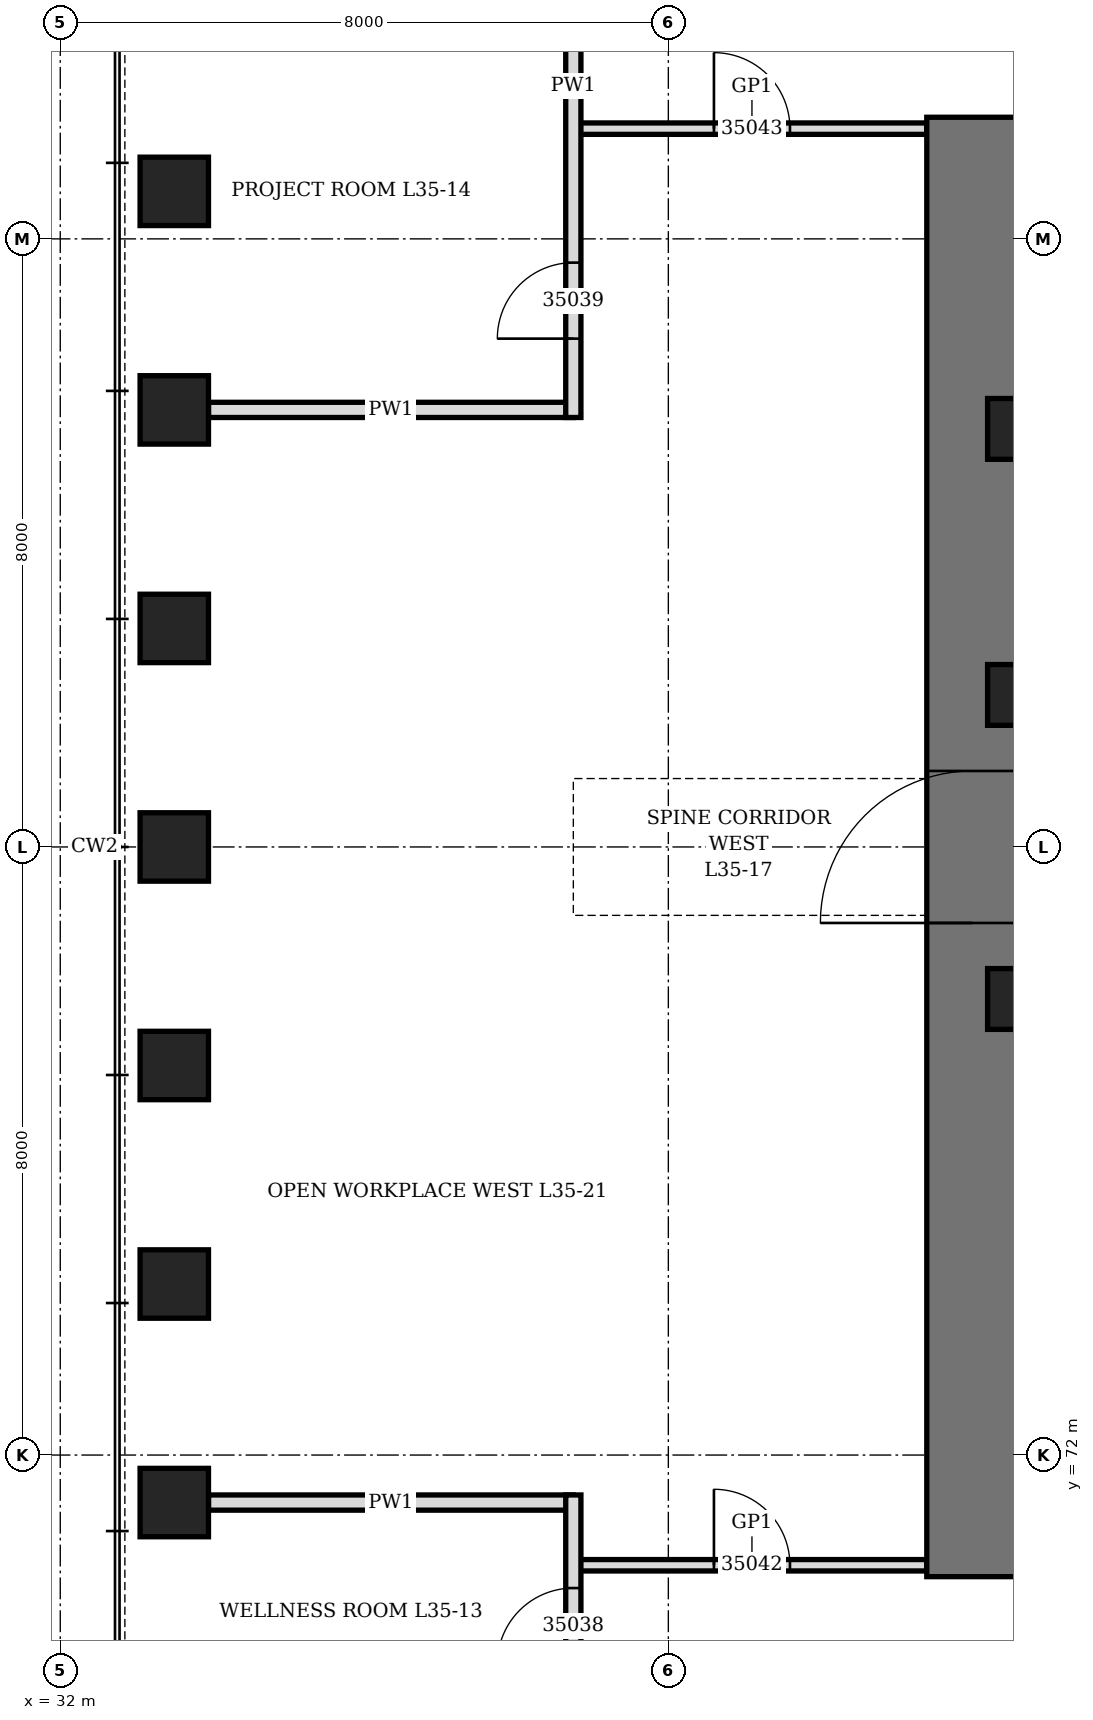
"""IFC4 building model, lengths in metres.
Left out: names, types, materials, properties, quantities, classifications, styles, units other than length and angle.
Written with IfcOpenShell. Run it as: python <this file> out.ifc"""

import sys

from ifc_helpers import new_model, si_unit, direction, frame, frame_2d, origin, origin_2d, place, context, subcontext, project, spatial, rectangle, hollow_rectangle, extrude, element, fill, save


model = new_model("IFC4")
c1 = context("Model", 3, precision=1e-05, world=origin(), true_north=direction((0.0, 1.0)))
c2 = subcontext(c1, "Body", "Model", "MODEL_VIEW")
j1 = project(units=[si_unit("LENGTHUNIT", "METRE"), si_unit("PLANEANGLEUNIT", "RADIAN")], contexts=[c1])
p1 = place(None, origin())
s1 = spatial("IfcSite", under=j1, at=p1, CompositionType="ELEMENT")
p2 = place(p1, origin())
s2 = spatial("IfcBuilding", under=s1, at=p2, CompositionType="ELEMENT")
p3 = place(p2, frame((0.0, 0.0, 158.5)))
s3 = spatial("IfcBuildingStorey", under=s2, at=p3, CompositionType="ELEMENT", Elevation=158.5)
for number, where, z_axis, x_axis in (
    (1, (33.5, 88.625, 0.0), (0.0, 0.0, 1.0), (0.0, 1.0, 0.0)),
    (2, (33.5, 85.75, 0.0), (0.0, 0.0, 1.0), (0.0, 1.0, 0.0)),
    (3, (33.5, 82.875, 0.0), (0.0, 0.0, 1.0), (0.0, 1.0, 0.0)),
    (4, (33.5, 80.0, 0.0), (0.0, 0.0, 1.0), (0.0, 1.0, 0.0)),
    (5, (33.5, 77.125, 0.0), (0.0, 0.0, 1.0), (0.0, 1.0, 0.0)),
    (6, (33.5, 74.25, 0.0), (0.0, 0.0, 1.0), (0.0, 1.0, 0.0)),
    (7, (33.5, 71.375, 0.0), (0.0, 0.0, 1.0), (0.0, 1.0, 0.0)),
):
    element("IfcColumn", number, at=place(p3, frame(where, z_axis=z_axis, x_axis=x_axis)), inside=s3, PredefinedType="COLUMN", context=c2, shape_type="SweptSolid", body=[
        extrude(hollow_rectangle(XDim=0.9, YDim=0.9, WallThickness=0.12, at=origin_2d()), origin(), (0.0, 0.0, 1.0), 4.2),
    ])
p4 = place(p3, frame((44.0, 70.4, 0.0), z_axis=(0.0, 0.0, 1.0), x_axis=(0.0, 1.0, 0.0)))
e8 = element("IfcWall", 8, at=p4, inside=s3, PredefinedType="SHEAR", context=c2, shape_type="SweptSolid", body=[
    extrude(rectangle(XDim=19.2, YDim=1.2, at=frame_2d((9.6, 0.0))), origin(), (0.0, 0.0, 1.0), 4.2),
])
p5 = place(p4, frame((8.6, 0.0, 0.0)))
e9 = element("IfcOpeningElement", 9, at=p5, cuts=e8, PredefinedType="OPENING", context=c2, shape_type="SweptSolid", body=[
    extrude(rectangle(XDim=2.0, YDim=2.4, at=frame_2d((1.0, 1.2))), frame((0.0, 0.61, 0.0), z_axis=(0.0, -1.0, 0.0), x_axis=(1.0, 0.0, 0.0)), (0.0, 0.0, 1.0), 1.22),
])
for number, where, z_axis, x_axis in (
    (10, (44.6, 78.0, 0.0), (0.0, 0.0, 1.0), (1.0, 0.0, 0.0)),
    (11, (44.6, 82.0, 0.0), (0.0, 0.0, 1.0), (1.0, 0.0, 0.0)),
    (12, (44.6, 85.5, 0.0), (0.0, 0.0, 1.0), (1.0, 0.0, 0.0)),
):
    element("IfcColumn", number, at=place(p3, frame(where, z_axis=z_axis, x_axis=x_axis)), inside=s3, PredefinedType="COLUMN", context=c2, shape_type="SweptSolid", body=[
        extrude(hollow_rectangle(XDim=0.8, YDim=0.8, WallThickness=0.1, at=origin_2d()), origin(), (0.0, 0.0, 1.0), 4.2),
    ])
for number, where, z_axis, x_axis in (
    (13, (33.95, 71.375, 0.0), (0.0, 0.0, 1.0), (1.0, 0.0, 0.0)),
    (14, (33.95, 85.75, 0.0), (0.0, 0.0, 1.0), (1.0, 0.0, 0.0)),
):
    element("IfcWall", number, at=place(p3, frame(where, z_axis=z_axis, x_axis=x_axis)), inside=s3, PredefinedType="PARTITIONING", context=c2, shape_type="SweptSolid", body=[
        extrude(rectangle(XDim=4.8, YDim=0.2, at=frame_2d((2.4, 0.0))), origin(), (0.0, 0.0, 1.0), 3.428),
    ])
p6 = place(p3, frame((38.8, 70.55, 0.0), z_axis=(0.0, 0.0, 1.0), x_axis=(1.0, 0.0, 0.0)))
e15 = element("IfcWall", 15, at=p6, inside=s3, PredefinedType="PARTITIONING", context=c2, shape_type="SweptSolid", body=[
    extrude(rectangle(XDim=4.6, YDim=0.15, at=frame_2d((2.3, 0.0))), origin(), (0.0, 0.0, 1.0), 4.04),
])
p7 = place(p6, frame((1.8, 0.0, 0.0)))
e16 = element("IfcOpeningElement", 16, at=p7, cuts=e15, PredefinedType="OPENING", context=c2, shape_type="SweptSolid", body=[
    extrude(rectangle(XDim=1.0, YDim=2.4, at=frame_2d((0.5, 1.2))), frame((0.0, 0.085, 0.0), z_axis=(0.0, -1.0, 0.0), x_axis=(1.0, 0.0, 0.0)), (0.0, 0.0, 1.0), 0.17),
])
p8 = place(p3, frame((38.8, 89.45, 0.0), z_axis=(0.0, 0.0, 1.0), x_axis=(1.0, 0.0, 0.0)))
e17 = element("IfcWall", 17, at=p8, inside=s3, PredefinedType="PARTITIONING", context=c2, shape_type="SweptSolid", body=[
    extrude(rectangle(XDim=4.6, YDim=0.15, at=frame_2d((2.3, 0.0))), origin(), (0.0, 0.0, 1.0), 4.04),
])
p9 = place(p8, frame((1.8, 0.0, 0.0)))
e18 = element("IfcOpeningElement", 18, at=p9, cuts=e17, PredefinedType="OPENING", context=c2, shape_type="SweptSolid", body=[
    extrude(rectangle(XDim=1.0, YDim=2.4, at=frame_2d((0.5, 1.2))), frame((0.0, 0.085, 0.0), z_axis=(0.0, -1.0, 0.0), x_axis=(1.0, 0.0, 0.0)), (0.0, 0.0, 1.0), 0.17),
])
p10 = place(p3, frame((38.75, 63.2, 0.0), z_axis=(0.0, 0.0, 1.0), x_axis=(0.0, 1.0, 0.0)))
e19 = element("IfcWall", 19, at=p10, inside=s3, PredefinedType="PARTITIONING", context=c2, shape_type="SweptSolid", body=[
    extrude(rectangle(XDim=8.275, YDim=0.2, at=frame_2d((4.138, 0.0))), origin(), (0.0, 0.0, 1.0), 4.04),
])
p11 = place(p10, frame((0.488, 0.0, 0.0)))
e20 = element("IfcOpeningElement", 20, at=p11, cuts=e19, PredefinedType="OPENING", context=c2, shape_type="SweptSolid", body=[
    extrude(rectangle(XDim=1.0, YDim=2.1, at=frame_2d((0.5, 1.05))), frame((0.0, 0.11, 0.0), z_axis=(0.0, -1.0, 0.0), x_axis=(1.0, 0.0, 0.0)), (0.0, 0.0, 1.0), 0.22),
])
p12 = place(p10, frame((6.05, 0.0, 0.0)))
e21 = element("IfcOpeningElement", 21, at=p12, cuts=e19, PredefinedType="OPENING", context=c2, shape_type="SweptSolid", body=[
    extrude(rectangle(XDim=1.0, YDim=2.1, at=frame_2d((0.5, 1.05))), frame((0.0, 0.11, 0.0), z_axis=(0.0, -1.0, 0.0), x_axis=(1.0, 0.0, 0.0)), (0.0, 0.0, 1.0), 0.22),
])
p13 = place(p3, frame((38.75, 85.65, 0.0), z_axis=(0.0, 0.0, 1.0), x_axis=(0.0, 1.0, 0.0)))
e22 = element("IfcWall", 22, at=p13, inside=s3, PredefinedType="PARTITIONING", context=c2, shape_type="SweptSolid", body=[
    extrude(rectangle(XDim=8.725, YDim=0.2, at=frame_2d((4.363, 0.0))), origin(), (0.0, 0.0, 1.0), 4.04),
])
p14 = place(p13, frame((1.038, 0.0, 0.0)))
e23 = element("IfcOpeningElement", 23, at=p14, cuts=e22, PredefinedType="OPENING", context=c2, shape_type="SweptSolid", body=[
    extrude(rectangle(XDim=1.0, YDim=2.1, at=frame_2d((0.5, 1.05))), frame((0.0, 0.11, 0.0), z_axis=(0.0, -1.0, 0.0), x_axis=(1.0, 0.0, 0.0)), (0.0, 0.0, 1.0), 0.22),
])
p15 = place(p13, frame((6.788, 0.0, 0.0)))
e24 = element("IfcOpeningElement", 24, at=p15, cuts=e22, PredefinedType="OPENING", context=c2, shape_type="SweptSolid", body=[
    extrude(rectangle(XDim=1.0, YDim=2.1, at=frame_2d((0.5, 1.05))), frame((0.0, 0.11, 0.0), z_axis=(0.0, -1.0, 0.0), x_axis=(1.0, 0.0, 0.0)), (0.0, 0.0, 1.0), 0.22),
])
p16 = place(p5, origin())
e25 = element("IfcDoor", 25, at=p16, inside=s3, OperationType="DOUBLE_DOOR_SINGLE_SWING", PredefinedType="DOOR", context=c2, shape_type="SweptSolid", body=[
    extrude(rectangle(XDim=2.0, YDim=2.4, at=frame_2d((1.0, 1.2))), frame((0.0, 0.35, 0.0), z_axis=(0.0, -1.0, 0.0), x_axis=(1.0, 0.0, 0.0)), (0.0, 0.0, 1.0), 0.7),
])
fill(e9, e25)
p17 = place(p12, origin())
e26 = element("IfcDoor", 26, at=p17, inside=s3, OperationType="SINGLE_SWING_LEFT", PredefinedType="DOOR", context=c2, shape_type="SweptSolid", body=[
    extrude(rectangle(XDim=1.0, YDim=2.1, at=frame_2d((0.5, 1.05))), frame((0.0, 0.1, 0.0), z_axis=(0.0, -1.0, 0.0), x_axis=(1.0, 0.0, 0.0)), (0.0, 0.0, 1.0), 0.199),
])
fill(e21, e26)
p18 = place(p14, origin())
e27 = element("IfcDoor", 27, at=p18, inside=s3, OperationType="SINGLE_SWING_LEFT", PredefinedType="DOOR", context=c2, shape_type="SweptSolid", body=[
    extrude(rectangle(XDim=1.0, YDim=2.1, at=frame_2d((0.5, 1.05))), frame((0.0, 0.1, 0.0), z_axis=(0.0, -1.0, 0.0), x_axis=(1.0, 0.0, 0.0)), (0.0, 0.0, 1.0), 0.199),
])
fill(e23, e27)
p19 = place(p7, origin())
e28 = element("IfcDoor", 28, at=p19, inside=s3, OperationType="SINGLE_SWING_RIGHT", PredefinedType="DOOR", context=c2, shape_type="SweptSolid", body=[
    extrude(rectangle(XDim=1.0, YDim=2.4, at=frame_2d((0.5, 1.2))), frame((0.0, 0.075, 0.0), z_axis=(0.0, -1.0, 0.0), x_axis=(1.0, 0.0, 0.0)), (0.0, 0.0, 1.0), 0.149),
])
fill(e16, e28)
p20 = place(p9, origin())
e29 = element("IfcDoor", 29, at=p20, inside=s3, OperationType="SINGLE_SWING_RIGHT", PredefinedType="DOOR", context=c2, shape_type="SweptSolid", body=[
    extrude(rectangle(XDim=1.0, YDim=2.4, at=frame_2d((0.5, 1.2))), frame((0.0, 0.075, 0.0), z_axis=(0.0, -1.0, 0.0), x_axis=(1.0, 0.0, 0.0)), (0.0, 0.0, 1.0), 0.149),
])
fill(e18, e29)
save(model, sys.argv[1])
